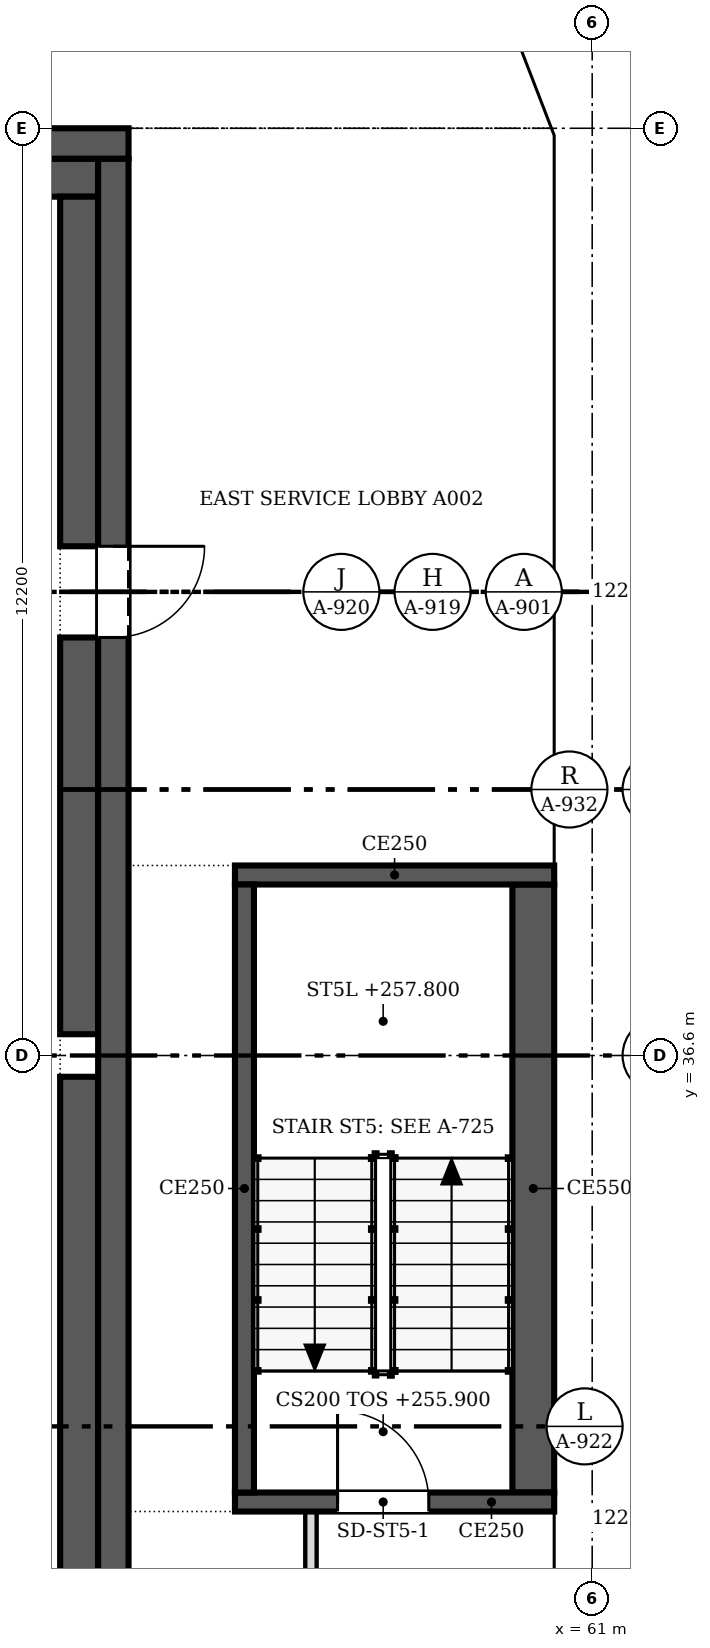
"""IFC4 building model, lengths in metres.
Left out: names, types, materials, properties, quantities, classifications, styles, units other than length and angle.
Written with IfcOpenShell. Run it as: python <this file> out.ifc"""

import sys

from ifc_helpers import new_model, si_unit, direction, frame, frame_2d, origin, place, context, subcontext, project, spatial, polyline, rectangle, outline, extrude, faceted_brep, source, transform, mapped, element, fill, save


model = new_model("IFC4")
c1 = context("Model", 3, precision=1e-05, world=origin(), true_north=direction((0.0, 1.0)))
c2 = subcontext(c1, "Body", "Model", "MODEL_VIEW")
j1 = project(units=[si_unit("LENGTHUNIT", "METRE"), si_unit("PLANEANGLEUNIT", "RADIAN")], contexts=[c1])
p1 = place(None, origin())
s1 = spatial("IfcSite", under=j1, at=p1, CompositionType="ELEMENT")
p2 = place(p1, origin())
s2 = spatial("IfcBuilding", under=s1, at=p2, CompositionType="ELEMENT")
p3 = place(p2, frame((0.0, 0.0, 255.9)))
s3 = spatial("IfcBuildingStorey", under=s2, at=p3, CompositionType="ELEMENT", Elevation=255.9)
m1 = source(origin(), c2, "Body", "SweptSolid", [
    extrude(outline(polyline([(3.05, 0.0), (6.1, 3.8), (3.05, 7.6), (0.0, 3.8), (3.05, 0.0)])), frame((0.0, 0.25, 0.0), z_axis=(0.0, -1.0, 0.0), x_axis=(1.0, 0.0, 0.0)), (0.0, 0.0, 1.0), 0.5),
])
p4 = place(p3, frame((60.75, 27.45, -3.8), z_axis=(0.0, 0.0, 1.0), x_axis=(0.0, 1.0, 0.0)))
e1 = element("IfcWall", 1, at=p4, inside=s3, PredefinedType="SOLIDWALL", context=c2, shape_type="MappedRepresentation", body=[
    mapped(m1, transform((0.0, 0.0, 0.0), scale=1.0)),
])
m2 = source(origin(), c2, "Body", "SweptSolid", [
    extrude(outline(polyline([(3.05, 0.399), (5.78, 3.8), (3.05, 7.2), (0.321, 3.8), (3.05, 0.399)])), frame((0.0, 0.26, 0.0), z_axis=(0.0, -1.0, 0.0), x_axis=(1.0, 0.0, 0.0)), (0.0, 0.0, 1.0), 0.52),
])
p5 = place(p4, origin())
e2 = element("IfcOpeningElement", 2, at=p5, cuts=e1, PredefinedType="OPENING", context=c2, shape_type="MappedRepresentation", body=[
    mapped(m2, transform((0.0, 0.0, 0.0), scale=1.0)),
])
m3 = source(origin(), c2, "Body", "Brep", [
    faceted_brep([(3.05, -0.25, 0.0), (6.1, -0.25, 3.8), (6.1, -0.25, 3.8), (3.05, -0.25, 7.6), (0.0, -0.25, 3.8), (0.0, 0.25, 3.8), (3.05, 0.25, 7.6), (6.1, 0.25, 3.8), (6.1, 0.25, 3.8), (3.05, 0.25, 0.0)], [[[0, 1, 2, 3, 4]], [[5, 6, 7, 8, 9]], [[9, 8, 1, 0]], [[7, 6, 3, 2]], [[6, 5, 4, 3]], [[5, 9, 0, 4]], [[1, 8, 7, 2]]]),
])
p6 = place(p3, frame((60.75, 33.55, -3.8), z_axis=(0.0, 0.0, 1.0), x_axis=(0.0, 1.0, 0.0)))
e3 = element("IfcWall", 3, at=p6, inside=s3, PredefinedType="SOLIDWALL", context=c2, shape_type="MappedRepresentation", body=[
    mapped(m3, transform((0.0, 0.0, 0.0), scale=1.0)),
])
p7 = place(p6, origin())
e4 = element("IfcOpeningElement", 4, at=p7, cuts=e3, PredefinedType="OPENING", context=c2, shape_type="MappedRepresentation", body=[
    mapped(m2, transform((0.0, 0.0, 0.0), scale=1.0)),
])
p8 = place(p3, frame((60.75, 39.65, -3.8), z_axis=(0.0, 0.0, 1.0), x_axis=(0.0, 1.0, 0.0)))
e5 = element("IfcWall", 5, at=p8, inside=s3, PredefinedType="SOLIDWALL", context=c2, shape_type="MappedRepresentation", body=[
    mapped(m1, transform((0.0, 0.0, 0.0), scale=1.0)),
])
p9 = place(p8, origin())
e6 = element("IfcOpeningElement", 6, at=p9, cuts=e5, PredefinedType="OPENING", context=c2, shape_type="MappedRepresentation", body=[
    mapped(m2, transform((0.0, 0.0, 0.0), scale=1.0)),
])
m4 = source(origin(), c2, "Body", "Brep", [
    faceted_brep([(3.003, -0.25, 0.0), (3.05, -0.25, 0.06), (3.05, -0.25, 7.54), (3.003, -0.25, 7.6), (0.0, -0.25, 3.8), (0.0, 0.25, 3.8), (2.957, 0.25, 7.541), (2.957, 0.25, 0.059), (3.003, 0.0, 0.0), (3.003, 0.0, 7.6)], [[[0, 1, 2, 3, 4]], [[5, 6, 7]], [[1, 0, 8]], [[9, 3, 2]], [[6, 5, 4, 3, 9]], [[5, 7, 8, 0, 4]], [[1, 8, 7, 6, 9, 2]]]),
])
p10 = place(p3, frame((60.75, 45.75, -3.8), z_axis=(0.0, 0.0, 1.0), x_axis=(0.0, 1.0, 0.0)))
e7 = element("IfcWall", 7, at=p10, inside=s3, PredefinedType="SOLIDWALL", context=c2, shape_type="MappedRepresentation", body=[
    mapped(m4, transform((0.0, 0.0, 0.0), scale=1.0)),
])
m5 = source(origin(), c2, "Body", "SweptSolid", [
    extrude(outline(polyline([(2.803, 6.944), (0.319, 3.8), (2.803, 0.656), (2.803, 6.944)])), frame((0.0, 0.26, 0.0), z_axis=(0.0, -1.0, 0.0), x_axis=(1.0, 0.0, 0.0)), (0.0, 0.0, 1.0), 0.52),
])
p11 = place(p10, origin())
e8 = element("IfcOpeningElement", 8, at=p11, cuts=e7, PredefinedType="OPENING", context=c2, shape_type="MappedRepresentation", body=[
    mapped(m5, transform((0.0, 0.0, 0.0), scale=1.0)),
])
m6 = source(origin(), c2, "Body", "Brep", [
    faceted_brep([(0.047, -0.25, 0.0), (2.997, -0.25, 3.8), (0.047, -0.25, 7.6), (0.0, -0.25, 7.541), (0.0, -0.25, 0.059), (0.093, 0.25, 7.54), (2.944, 0.25, 3.868), (2.944, 0.25, 3.732), (0.093, 0.25, 0.06), (2.997, 0.0, 3.8), (0.047, 0.0, 0.0), (0.047, 0.0, 7.6)], [[[0, 1, 2, 3, 4]], [[5, 6, 7, 8]], [[8, 7, 9, 1, 0, 10]], [[6, 5, 11, 2, 1, 9]], [[3, 2, 11]], [[10, 0, 4]], [[8, 10, 4, 3, 11, 5]], [[9, 7, 6]]]),
])
p12 = place(p3, frame((60.767, 48.71, -3.8), z_axis=(0.0, 0.0, 1.0), x_axis=(-0.359901446078, 0.932990326376, 0.0)))
e9 = element("IfcWall", 9, at=p12, inside=s3, PredefinedType="SOLIDWALL", context=c2, shape_type="MappedRepresentation", body=[
    mapped(m6, transform((0.0, 0.0, 0.0), scale=1.0)),
])
m7 = source(origin(), c2, "Body", "SweptSolid", [
    extrude(outline(polyline([(0.247, 0.665), (2.681, 3.8), (0.247, 6.935), (0.247, 0.665)])), frame((0.0, 0.26, 0.0), z_axis=(0.0, -1.0, 0.0), x_axis=(1.0, 0.0, 0.0)), (0.0, 0.0, 1.0), 0.52),
])
p13 = place(p12, origin())
e10 = element("IfcOpeningElement", 10, at=p13, cuts=e9, PredefinedType="OPENING", context=c2, shape_type="MappedRepresentation", body=[
    mapped(m7, transform((0.0, 0.0, 0.0), scale=1.0)),
])
m8 = source(origin(), c2, "Body", "Brep", [
    faceted_brep([(3.003, -0.25, 0.0), (6.053, -0.25, 3.8), (0.0, -0.25, 3.8), (0.047, 0.25, 3.8), (6.053, 0.25, 3.8), (3.003, 0.25, 0.0), (0.047, 0.25, 3.741), (0.0, 0.0, 3.8)], [[[0, 1, 2]], [[3, 4, 5, 6]], [[5, 4, 1, 0]], [[4, 3, 7, 2, 1]], [[6, 5, 0, 2, 7]], [[6, 7, 3]]]),
])
p14 = place(p3, frame((60.75, 24.447, 0.0), z_axis=(0.0, 0.0, 1.0), x_axis=(0.0, 1.0, 0.0)))
e11 = element("IfcWall", 11, at=p14, inside=s3, PredefinedType="SOLIDWALL", context=c2, shape_type="MappedRepresentation", body=[
    mapped(m8, transform((0.0, 0.0, 0.0), scale=1.0)),
])
m9 = source(origin(), c2, "Body", "SweptSolid", [
    extrude(outline(polyline([(3.005, 0.401), (5.532, 3.55), (0.516, 3.55), (3.005, 0.401)])), frame((0.0, 0.26, 0.0), z_axis=(0.0, -1.0, 0.0), x_axis=(1.0, 0.0, 0.0)), (0.0, 0.0, 1.0), 0.52),
])
p15 = place(p14, origin())
e12 = element("IfcOpeningElement", 12, at=p15, cuts=e11, PredefinedType="OPENING", context=c2, shape_type="MappedRepresentation", body=[
    mapped(m9, transform((0.0, 0.0, 0.0), scale=1.0)),
])
m10 = source(origin(), c2, "Body", "SweptSolid", [
    extrude(outline(polyline([(3.05, 0.0), (6.1, 3.8), (0.0, 3.8), (3.05, 0.0)])), frame((0.0, 0.25, 0.0), z_axis=(0.0, -1.0, 0.0), x_axis=(1.0, 0.0, 0.0)), (0.0, 0.0, 1.0), 0.5),
])
p16 = place(p3, frame((60.75, 30.5, 0.0), z_axis=(0.0, 0.0, 1.0), x_axis=(0.0, 1.0, 0.0)))
e13 = element("IfcWall", 13, at=p16, inside=s3, PredefinedType="SOLIDWALL", context=c2, shape_type="MappedRepresentation", body=[
    mapped(m10, transform((0.0, 0.0, 0.0), scale=1.0)),
])
m11 = source(origin(), c2, "Body", "SweptSolid", [
    extrude(outline(polyline([(3.05, 0.399), (5.579, 3.55), (0.521, 3.55), (3.05, 0.399)])), frame((0.0, 0.26, 0.0), z_axis=(0.0, -1.0, 0.0), x_axis=(1.0, 0.0, 0.0)), (0.0, 0.0, 1.0), 0.52),
])
p17 = place(p16, origin())
e14 = element("IfcOpeningElement", 14, at=p17, cuts=e13, PredefinedType="OPENING", context=c2, shape_type="MappedRepresentation", body=[
    mapped(m11, transform((0.0, 0.0, 0.0), scale=1.0)),
])
m12 = source(origin(), c2, "Body", "Brep", [
    faceted_brep([(3.05, -0.25, 0.0), (6.1, -0.25, 3.8), (6.1, -0.25, 3.8), (0.0, -0.25, 3.8), (0.0, 0.25, 3.8), (6.1, 0.25, 3.8), (6.1, 0.25, 3.8), (3.05, 0.25, 0.0)], [[[0, 1, 2, 3]], [[4, 5, 6, 7]], [[7, 6, 1, 0]], [[5, 4, 3, 2]], [[4, 7, 0, 3]], [[1, 6, 5, 2]]]),
])
p18 = place(p3, frame((60.75, 36.6, 0.0), z_axis=(0.0, 0.0, 1.0), x_axis=(0.0, 1.0, 0.0)))
e15 = element("IfcWall", 15, at=p18, inside=s3, PredefinedType="SOLIDWALL", context=c2, shape_type="MappedRepresentation", body=[
    mapped(m12, transform((0.0, 0.0, 0.0), scale=1.0)),
])
p19 = place(p18, origin())
e16 = element("IfcOpeningElement", 16, at=p19, cuts=e15, PredefinedType="OPENING", context=c2, shape_type="MappedRepresentation", body=[
    mapped(m11, transform((0.0, 0.0, 0.0), scale=1.0)),
])
m13 = source(origin(), c2, "Body", "Brep", [
    faceted_brep([(3.05, -0.25, 0.0), (6.053, -0.25, 3.8), (0.0, -0.25, 3.8), (0.0, 0.25, 3.8), (6.007, 0.25, 3.8), (6.007, 0.25, 3.741), (3.05, 0.25, 0.0), (6.053, 0.0, 3.8)], [[[0, 1, 2]], [[3, 4, 5, 6]], [[6, 5, 7, 1, 0]], [[4, 3, 2, 1, 7]], [[3, 6, 0, 2]], [[5, 4, 7]]]),
])
p20 = place(p3, frame((60.75, 42.7, 0.0), z_axis=(0.0, 0.0, 1.0), x_axis=(0.0, 1.0, 0.0)))
e17 = element("IfcWall", 17, at=p20, inside=s3, PredefinedType="SOLIDWALL", context=c2, shape_type="MappedRepresentation", body=[
    mapped(m13, transform((0.0, 0.0, 0.0), scale=1.0)),
])
m14 = source(origin(), c2, "Body", "SweptSolid", [
    extrude(outline(polyline([(3.049, 0.401), (5.537, 3.55), (0.521, 3.55), (3.049, 0.401)])), frame((0.0, 0.26, 0.0), z_axis=(0.0, -1.0, 0.0), x_axis=(1.0, 0.0, 0.0)), (0.0, 0.0, 1.0), 0.52),
])
p21 = place(p20, origin())
e18 = element("IfcOpeningElement", 18, at=p21, cuts=e17, PredefinedType="OPENING", context=c2, shape_type="MappedRepresentation", body=[
    mapped(m14, transform((0.0, 0.0, 0.0), scale=1.0)),
])
m15 = source(origin(), c2, "Body", "Brep", [
    faceted_brep([(2.95, -0.25, 0.0), (3.003, -0.25, 0.068), (3.003, -0.25, 3.8), (0.0, -0.25, 3.8), (0.047, 0.25, 3.8), (2.898, 0.25, 3.8), (2.898, 0.25, 0.068), (0.047, 0.25, 3.74), (2.95, 0.0, 0.0), (0.0, 0.0, 3.8)], [[[0, 1, 2, 3]], [[4, 5, 6, 7]], [[1, 0, 8]], [[5, 4, 9, 3, 2]], [[7, 6, 8, 0, 3, 9]], [[7, 9, 4]], [[1, 8, 6, 5, 2]]]),
])
p22 = place(p3, frame((60.75, 48.753, 0.0), z_axis=(0.0, 0.0, 1.0), x_axis=(-0.35992665181, 0.932980602862, 0.0)))
e19 = element("IfcWall", 19, at=p22, inside=s3, PredefinedType="SOLIDWALL", context=c2, shape_type="MappedRepresentation", body=[
    mapped(m15, transform((0.0, 0.0, 0.0), scale=1.0)),
])
m16 = source(origin(), c2, "Body", "SweptSolid", [
    extrude(outline(polyline([(2.75, 3.55), (0.511, 3.55), (2.75, 0.665), (2.75, 3.55)])), frame((0.0, 0.26, 0.0), z_axis=(0.0, -1.0, 0.0), x_axis=(1.0, 0.0, 0.0)), (0.0, 0.0, 1.0), 0.52),
])
p23 = place(p22, origin())
e20 = element("IfcOpeningElement", 20, at=p23, cuts=e19, PredefinedType="OPENING", context=c2, shape_type="MappedRepresentation", body=[
    mapped(m16, transform((0.0, 0.0, 0.0), scale=1.0)),
])
p24 = place(p3, frame((30.5, 48.6, 0.0), z_axis=(0.0, 0.0, 1.0), x_axis=(1.0, 0.0, 0.0)))
e21 = element("IfcWall", 21, at=p24, inside=s3, PredefinedType="SHEAR", context=c2, shape_type="SweptSolid", body=[
    extrude(rectangle(XDim=24.4, YDim=0.4, at=frame_2d((12.2, 0.0))), origin(), (0.0, 0.0, 1.0), 3.8),
])
p25 = place(p3, frame((54.7, 48.4, 0.0), z_axis=(0.0, 0.0, 1.0), x_axis=(0.0, -1.0, 0.0)))
e22 = element("IfcWall", 22, at=p25, inside=s3, PredefinedType="SHEAR", context=c2, shape_type="SweptSolid", body=[
    extrude(rectangle(XDim=23.6, YDim=0.4, at=frame_2d((11.8, 0.0))), origin(), (0.0, 0.0, 1.0), 3.8),
])
m17 = source(origin(), c2, "Body", "SweptSolid", [
    extrude(rectangle(XDim=1.2, YDim=2.1, at=frame_2d((0.6, 1.05))), frame((0.0, 0.21, 0.0), z_axis=(0.0, -1.0, 0.0), x_axis=(1.0, 0.0, 0.0)), (0.0, 0.0, 1.0), 0.42),
])
p26 = place(p25, frame((5.1, 0.0, 0.0)))
e23 = element("IfcOpeningElement", 23, at=p26, cuts=e22, PredefinedType="OPENING", context=c2, shape_type="MappedRepresentation", body=[
    mapped(m17, transform((0.0, 0.0, 0.0), scale=1.0)),
])
p27 = place(p3, frame((30.9, 48.15, 0.0), z_axis=(0.0, 0.0, 1.0), x_axis=(1.0, 0.0, 0.0)))
e24 = element("IfcWall", 24, at=p27, inside=s3, PredefinedType="SOLIDWALL", context=c2, shape_type="SweptSolid", body=[
    extrude(rectangle(XDim=23.6, YDim=0.5, at=frame_2d((11.8, 0.0))), origin(), (0.0, 0.0, 1.0), 3.8),
])
p28 = place(p3, frame((54.25, 25.3, 0.0), z_axis=(0.0, 0.0, 1.0), x_axis=(0.0, 1.0, 0.0)))
e25 = element("IfcWall", 25, at=p28, inside=s3, PredefinedType="SOLIDWALL", context=c2, shape_type="SweptSolid", body=[
    extrude(rectangle(XDim=11.02, YDim=0.5, at=frame_2d((5.51, 0.0))), origin(), (0.0, 0.0, 1.0), 3.8),
])
p29 = place(p3, frame((54.25, 36.88, 0.0), z_axis=(0.0, 0.0, 1.0), x_axis=(0.0, 1.0, 0.0)))
e26 = element("IfcWall", 26, at=p29, inside=s3, PredefinedType="SOLIDWALL", context=c2, shape_type="SweptSolid", body=[
    extrude(rectangle(XDim=5.22, YDim=0.5, at=frame_2d((2.61, 0.0))), origin(), (0.0, 0.0, 1.0), 3.8),
])
p30 = place(p3, frame((54.25, 43.3, 0.0), z_axis=(0.0, 0.0, 1.0), x_axis=(0.0, 1.0, 0.0)))
e27 = element("IfcWall", 27, at=p30, inside=s3, PredefinedType="SOLIDWALL", context=c2, shape_type="SweptSolid", body=[
    extrude(rectangle(XDim=4.6, YDim=0.5, at=frame_2d((2.3, 0.0))), origin(), (0.0, 0.0, 1.0), 3.8),
])
p31 = place(p3, frame((60.5, 30.725, 0.0), z_axis=(0.0, 0.0, 1.0), x_axis=(-1.0, 0.0, 0.0)))
e28 = element("IfcWall", 28, at=p31, inside=s3, PredefinedType="SOLIDWALL", context=c2, shape_type="SweptSolid", body=[
    extrude(rectangle(XDim=4.2, YDim=0.25, at=frame_2d((2.1, 0.0))), origin(), (0.0, 0.0, 1.0), 3.8),
])
m18 = source(origin(), c2, "Body", "SweptSolid", [
    extrude(rectangle(XDim=1.2, YDim=2.1, at=frame_2d((0.6, 1.05))), frame((0.0, 0.135, 0.0), z_axis=(0.0, -1.0, 0.0), x_axis=(1.0, 0.0, 0.0)), (0.0, 0.0, 1.0), 0.27),
])
p32 = place(p31, frame((1.65, 0.0, 0.0)))
e29 = element("IfcOpeningElement", 29, at=p32, cuts=e28, PredefinedType="OPENING", context=c2, shape_type="MappedRepresentation", body=[
    mapped(m18, transform((0.0, 0.0, 0.0), scale=1.0)),
])
p33 = place(p3, frame((56.425, 30.85, 0.0), z_axis=(0.0, 0.0, 1.0), x_axis=(0.0, 1.0, 0.0)))
e30 = element("IfcWall", 30, at=p33, inside=s3, PredefinedType="SOLIDWALL", context=c2, shape_type="SweptSolid", body=[
    extrude(rectangle(XDim=8.0, YDim=0.25, at=frame_2d((4.0, 0.0))), origin(), (0.0, 0.0, 1.0), 3.8),
])
p34 = place(p3, frame((56.3, 38.975, 0.0), z_axis=(0.0, 0.0, 1.0), x_axis=(1.0, 0.0, 0.0)))
e31 = element("IfcWall", 31, at=p34, inside=s3, PredefinedType="SOLIDWALL", context=c2, shape_type="SweptSolid", body=[
    extrude(rectangle(XDim=4.2, YDim=0.25, at=frame_2d((2.1, 0.0))), origin(), (0.0, 0.0, 1.0), 3.8),
])
p35 = place(p3, frame((60.225, 38.85, 0.0), z_axis=(0.0, 0.0, 1.0), x_axis=(0.0, -1.0, 0.0)))
e32 = element("IfcWall", 32, at=p35, inside=s3, PredefinedType="SOLIDWALL", context=c2, shape_type="SweptSolid", body=[
    extrude(rectangle(XDim=8.0, YDim=0.55, at=frame_2d((4.0, 0.0))), origin(), (0.0, 0.0, 1.0), 3.8),
])
p36 = place(p3, frame((57.3, 30.6, 0.0), z_axis=(0.0, 0.0, 1.0), x_axis=(0.0, -1.0, 0.0)))
e33 = element("IfcWall", 33, at=p36, inside=s3, PredefinedType="PARTITIONING", context=c2, shape_type="SweptSolid", body=[
    extrude(rectangle(XDim=8.524, YDim=0.15, at=frame_2d((4.262, 0.0))), origin(), (0.0, 0.0, 1.0), 2.947),
])
m19 = source(origin(), c2, "Body", "SweptSolid", [
    extrude(rectangle(XDim=0.9, YDim=2.1, at=frame_2d((0.45, 1.05))), frame((0.0, 0.085, 0.0), z_axis=(0.0, -1.0, 0.0), x_axis=(1.0, 0.0, 0.0)), (0.0, 0.0, 1.0), 0.17),
])
p37 = place(p36, frame((3.824, 0.0, 0.0)))
e34 = element("IfcOpeningElement", 34, at=p37, cuts=e33, PredefinedType="OPENING", context=c2, shape_type="MappedRepresentation", body=[
    mapped(m19, transform((0.0, 0.0, 0.0), scale=1.0)),
])
m20 = source(origin(), c2, "Body", "SweptSolid", [
    extrude(rectangle(XDim=1.2, YDim=2.1, at=frame_2d((0.6, 1.05))), frame((0.0, 0.025, 0.0), z_axis=(0.0, -1.0, 0.0), x_axis=(1.0, 0.0, 0.0)), (0.0, 0.0, 1.0), 0.05),
])
p38 = place(p26, origin())
e35 = element("IfcDoor", 35, at=p38, inside=s3, OperationType="SINGLE_SWING_LEFT", PredefinedType="DOOR", context=c2, shape_type="MappedRepresentation", body=[
    mapped(m20, transform((0.0, 0.0, 0.0), scale=1.0)),
])
fill(e23, e35)
p39 = place(p32, origin())
e36 = element("IfcDoor", 36, at=p39, inside=s3, OperationType="SINGLE_SWING_RIGHT", PredefinedType="DOOR", context=c2, shape_type="MappedRepresentation", body=[
    mapped(m20, transform((0.0, 0.0, 0.0), scale=1.0)),
])
fill(e29, e36)
save(model, sys.argv[1])
